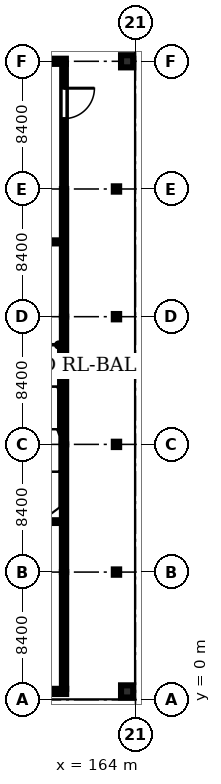
"""IFC4 building model, lengths in metres.
Left out: names, types, materials, properties, quantities, classifications, styles, units other than length and angle.
Written with IfcOpenShell. Run it as: python <this file> out.ifc"""

import sys

from ifc_helpers import new_model, si_unit, direction, frame, frame_2d, origin, origin_2d, place, context, subcontext, project, spatial, rectangle, circle, i_section, extrude, element, fill, save


model = new_model("IFC4")
c1 = context("Model", 3, precision=1e-05, world=origin(), true_north=direction((0.0, 1.0)))
c2 = subcontext(c1, "Body", "Model", "MODEL_VIEW")
j1 = project(units=[si_unit("LENGTHUNIT", "METRE"), si_unit("PLANEANGLEUNIT", "RADIAN")], contexts=[c1])
p1 = place(None, origin())
s1 = spatial("IfcSite", under=j1, at=p1, CompositionType="ELEMENT")
p2 = place(p1, origin())
s2 = spatial("IfcBuilding", under=s1, at=p2, CompositionType="ELEMENT")
p3 = place(p2, origin())
s3 = spatial("IfcBuildingStorey", under=s2, at=p3, CompositionType="ELEMENT", Elevation=0.0)
for number, where, z_axis, x_axis in (
    (1, (163.45, 0.55, 0.0), (0.0, 0.0, 1.0), (1.0, 0.0, 0.0)),
    (2, (163.45, 42.0, 0.0), (0.0, 0.0, 1.0), (1.0, 0.0, 0.0)),
):
    element("IfcColumn", number, at=place(p3, frame(where, z_axis=z_axis, x_axis=x_axis)), inside=s3, PredefinedType="COLUMN", context=c2, shape_type="SweptSolid", body=[
        extrude(circle(Radius=0.4, at=origin_2d()), origin(), (0.0, 0.0, 1.0), 5.18),
    ])
p4 = place(p3, frame((162.75, 8.4, 0.0), z_axis=(0.0, 0.0, 1.0), x_axis=(1.0, 0.0, 0.0)))
e3 = element("IfcColumn", 3, at=p4, inside=s3, PredefinedType="COLUMN", context=c2, shape_type="SweptSolid", body=[
    extrude(i_section(OverallWidth=0.35, OverallDepth=0.35, WebThickness=0.012, FlangeThickness=0.019, at=origin_2d()), origin(), (0.0, 0.0, 1.0), 5.18),
])
for number, where, z_axis, x_axis in (
    (4, (162.75, 16.8, 0.0), (0.0, 0.0, 1.0), (1.0, 0.0, 0.0)),
    (5, (162.75, 25.2, 0.0), (0.0, 0.0, 1.0), (1.0, 0.0, 0.0)),
):
    element("IfcColumn", number, at=place(p3, frame(where, z_axis=z_axis, x_axis=x_axis)), inside=s3, PredefinedType="COLUMN", context=c2, shape_type="SweptSolid", body=[
        extrude(i_section(OverallWidth=0.35, OverallDepth=0.35, WebThickness=0.012, FlangeThickness=0.019, at=origin_2d()), origin(), (0.0, 0.0, 1.0), 5.4),
    ])
p5 = place(p3, frame((162.75, 33.6, 0.0), z_axis=(0.0, 0.0, 1.0), x_axis=(1.0, 0.0, 0.0)))
e6 = element("IfcColumn", 6, at=p5, inside=s3, PredefinedType="COLUMN", context=c2, shape_type="SweptSolid", body=[
    extrude(i_section(OverallWidth=0.35, OverallDepth=0.35, WebThickness=0.012, FlangeThickness=0.019, at=origin_2d()), origin(), (0.0, 0.0, 1.0), 5.18),
])
p6 = place(p3, frame((159.3, 8.4, 0.0), z_axis=(0.0, 0.0, 1.0), x_axis=(0.0, -1.0, 0.0)))
e7 = element("IfcWall", 7, at=p6, inside=s3, PredefinedType="STANDARD", context=c2, shape_type="SweptSolid", body=[
    extrude(rectangle(XDim=7.68, YDim=0.28, at=frame_2d((3.84, 0.0))), origin(), (0.0, 0.0, 1.0), 5.18),
])
p7 = place(p3, frame((159.3, 16.8, 0.0), z_axis=(0.0, 0.0, 1.0), x_axis=(0.0, -1.0, 0.0)))
e8 = element("IfcWall", 8, at=p7, inside=s3, PredefinedType="STANDARD", context=c2, shape_type="SweptSolid", body=[
    extrude(rectangle(XDim=8.4, YDim=0.28, at=frame_2d((4.2, 0.0))), origin(), (0.0, 0.0, 1.0), 5.18),
])
p8 = place(p3, frame((159.3, 25.2, 0.0), z_axis=(0.0, 0.0, 1.0), x_axis=(0.0, -1.0, 0.0)))
e9 = element("IfcWall", 9, at=p8, inside=s3, PredefinedType="STANDARD", context=c2, shape_type="SweptSolid", body=[
    extrude(rectangle(XDim=8.4, YDim=0.28, at=frame_2d((4.2, 0.0))), origin(), (0.0, 0.0, 1.0), 5.18),
])
p9 = place(p3, frame((159.3, 33.6, 0.0), z_axis=(0.0, 0.0, 1.0), x_axis=(0.0, -1.0, 0.0)))
e10 = element("IfcWall", 10, at=p9, inside=s3, PredefinedType="STANDARD", context=c2, shape_type="SweptSolid", body=[
    extrude(rectangle(XDim=8.4, YDim=0.28, at=frame_2d((4.2, 0.0))), origin(), (0.0, 0.0, 1.0), 5.18),
])
p10 = place(p3, frame((159.3, 41.83, 0.0), z_axis=(0.0, 0.0, 1.0), x_axis=(0.0, -1.0, 0.0)))
e11 = element("IfcWall", 11, at=p10, inside=s3, PredefinedType="STANDARD", context=c2, shape_type="SweptSolid", body=[
    extrude(rectangle(XDim=8.23, YDim=0.24, at=frame_2d((4.115, 0.0))), origin(), (0.0, 0.0, 1.0), 5.18),
])
p11 = place(p10, frame((1.6, 0.0, 0.0)))
e12 = element("IfcOpeningElement", 12, at=p11, cuts=e11, PredefinedType="OPENING", context=c2, shape_type="SweptSolid", body=[
    extrude(rectangle(XDim=2.0, YDim=2.4, at=frame_2d((1.0, 1.2))), frame((0.0, 0.13, 0.0), z_axis=(0.0, -1.0, 0.0), x_axis=(1.0, 0.0, 0.0)), (0.0, 0.0, 1.0), 0.26),
])
p12 = place(p10, frame((4.4, 0.0, 0.8)))
e13 = element("IfcOpeningElement", 13, at=p12, cuts=e11, PredefinedType="OPENING", context=c2, shape_type="SweptSolid", body=[
    extrude(rectangle(XDim=2.6, YDim=2.4, at=frame_2d((1.3, 1.2))), frame((0.0, 0.13, 0.0), z_axis=(0.0, -1.0, 0.0), x_axis=(1.0, 0.0, 0.0)), (0.0, 0.0, 1.0), 0.26),
])
p13 = place(p3, frame((159.44, 0.55, 0.0), z_axis=(0.0, 0.0, 1.0), x_axis=(-1.0, 0.0, 0.0)))
e14 = element("IfcWall", 14, at=p13, inside=s3, PredefinedType="STANDARD", context=c2, shape_type="SweptSolid", body=[
    extrude(rectangle(XDim=3.44, YDim=0.34, at=frame_2d((1.72, 0.0))), origin(), (0.0, 0.0, 1.0), 4.43),
])
p14 = place(p3, frame((156.0, 42.0, 0.0), z_axis=(0.0, 0.0, 1.0), x_axis=(1.0, 0.0, 0.0)))
e15 = element("IfcWall", 15, at=p14, inside=s3, PredefinedType="STANDARD", context=c2, shape_type="SweptSolid", body=[
    extrude(rectangle(XDim=3.42, YDim=0.34, at=frame_2d((1.71, 0.0))), origin(), (0.0, 0.0, 1.0), 4.43),
])
p15 = place(p3, frame((145.32, 30.12, 0.0), z_axis=(0.0, 0.0, 1.0), x_axis=(1.0, 0.0, 0.0)))
e16 = element("IfcWall", 16, at=p15, inside=s3, PredefinedType="SOLIDWALL", context=c2, shape_type="SweptSolid", body=[
    extrude(rectangle(XDim=13.83, YDim=0.2, at=frame_2d((6.915, 0.0))), origin(), (0.0, 0.0, 1.0), 5.18),
])
p16 = place(p15, frame((2.4, 0.0, 0.0)))
e17 = element("IfcOpeningElement", 17, at=p16, cuts=e16, PredefinedType="OPENING", context=c2, shape_type="SweptSolid", body=[
    extrude(rectangle(XDim=1.85, YDim=2.25, at=frame_2d((0.925, 1.125))), frame((0.0, 0.11, 0.0), z_axis=(0.0, -1.0, 0.0), x_axis=(1.0, 0.0, 0.0)), (0.0, 0.0, 1.0), 0.22),
])
p17 = place(p15, frame((9.2, 0.0, 0.0)))
e18 = element("IfcOpeningElement", 18, at=p17, cuts=e16, PredefinedType="OPENING", context=c2, shape_type="SweptSolid", body=[
    extrude(rectangle(XDim=1.85, YDim=2.25, at=frame_2d((0.925, 1.125))), frame((0.0, 0.11, 0.0), z_axis=(0.0, -1.0, 0.0), x_axis=(1.0, 0.0, 0.0)), (0.0, 0.0, 1.0), 0.22),
])
p18 = place(p3, frame((145.32, 11.72, 0.0), z_axis=(0.0, 0.0, 1.0), x_axis=(1.0, 0.0, 0.0)))
e19 = element("IfcWall", 19, at=p18, inside=s3, PredefinedType="STANDARD", context=c2, shape_type="SweptSolid", body=[
    extrude(rectangle(XDim=13.83, YDim=0.18, at=frame_2d((6.915, 0.0))), origin(), (0.0, 0.0, 1.0), 5.18),
])
p19 = place(p18, frame((2.6, 0.0, 0.0)))
e20 = element("IfcOpeningElement", 20, at=p19, cuts=e19, PredefinedType="OPENING", context=c2, shape_type="SweptSolid", body=[
    extrude(rectangle(XDim=1.05, YDim=2.15, at=frame_2d((0.525, 1.075))), frame((0.0, 0.1, 0.0), z_axis=(0.0, -1.0, 0.0), x_axis=(1.0, 0.0, 0.0)), (0.0, 0.0, 1.0), 0.2),
])
p20 = place(p11, origin())
e21 = element("IfcDoor", 21, at=p20, inside=s3, OperationType="SINGLE_SWING_LEFT", PredefinedType="DOOR", context=c2, shape_type="SweptSolid", body=[
    extrude(rectangle(XDim=2.0, YDim=2.4, at=frame_2d((1.0, 1.2))), frame((0.0, 0.025, 0.0), z_axis=(0.0, -1.0, 0.0), x_axis=(1.0, 0.0, 0.0)), (0.0, 0.0, 1.0), 0.05),
])
fill(e12, e21)
p21 = place(p12, origin())
e22 = element("IfcWindow", 22, at=p21, inside=s3, PartitioningType="TRIPLE_PANEL_VERTICAL", PredefinedType="WINDOW", context=c2, shape_type="SweptSolid", body=[
    extrude(rectangle(XDim=2.6, YDim=2.4, at=frame_2d((1.3, 1.2))), frame((0.0, 0.03, 0.0), z_axis=(0.0, -1.0, 0.0), x_axis=(1.0, 0.0, 0.0)), (0.0, 0.0, 1.0), 0.06),
])
fill(e13, e22)
save(model, sys.argv[1])
